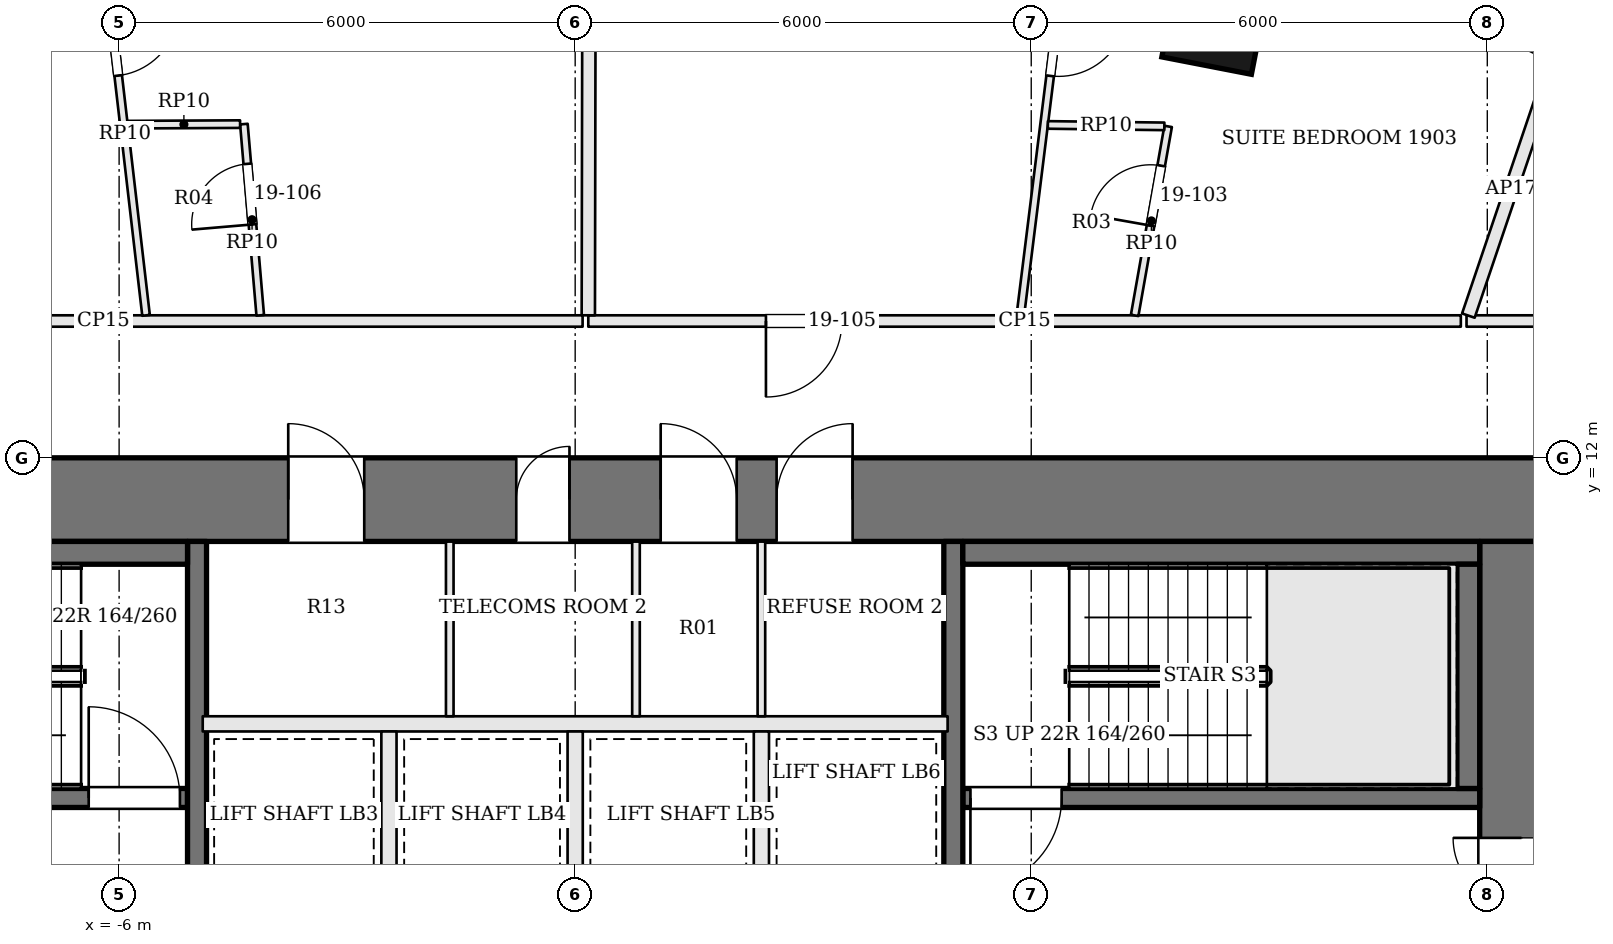
"""IFC4 building model, lengths in metres.
Left out: names, types, materials, properties, quantities, classifications, styles, units other than length and angle.
Written with IfcOpenShell. Run it as: python <this file> out.ifc"""

import sys

from ifc_helpers import new_model, si_unit, direction, frame, frame_2d, origin, origin_2d, place, context, subcontext, project, spatial, rectangle, extrude, element, fill, save


model = new_model("IFC4")
c1 = context("Model", 3, precision=1e-05, world=origin(), true_north=direction((0.0, 1.0)))
c2 = subcontext(c1, "Body", "Model", "MODEL_VIEW")
j1 = project(units=[si_unit("LENGTHUNIT", "METRE"), si_unit("PLANEANGLEUNIT", "RADIAN")], contexts=[c1])
p1 = place(None, origin())
s1 = spatial("IfcSite", under=j1, at=p1, CompositionType="ELEMENT")
p2 = place(p1, origin())
s2 = spatial("IfcBuilding", under=s1, at=p2, CompositionType="ELEMENT")
p3 = place(p2, frame((0.0, 0.0, 85.2)))
s3 = spatial("IfcBuildingStorey", under=s2, at=p3, CompositionType="ELEMENT", Elevation=85.2)
p4 = place(p3, frame((-13.0, 11.45, 0.0), z_axis=(0.0, 0.0, 1.0), x_axis=(1.0, 0.0, 0.0)))
e1 = element("IfcWall", 1, at=p4, inside=s3, PredefinedType="SHEAR", context=c2, shape_type="SweptSolid", body=[
    extrude(rectangle(XDim=26.0, YDim=1.1, at=frame_2d((13.0, 0.0))), origin(), (0.0, 0.0, 1.0), 3.6),
])
p5 = place(p4, frame((9.225, 0.0, 0.0)))
e2 = element("IfcOpeningElement", 2, at=p5, cuts=e1, PredefinedType="OPENING", context=c2, shape_type="SweptSolid", body=[
    extrude(rectangle(XDim=1.0, YDim=2.1, at=frame_2d((0.5, 1.05))), frame((0.0, 0.56, 0.0), z_axis=(0.0, -1.0, 0.0), x_axis=(1.0, 0.0, 0.0)), (0.0, 0.0, 1.0), 1.12),
])
p6 = place(p4, frame((12.225, 0.0, 0.0)))
e3 = element("IfcOpeningElement", 3, at=p6, cuts=e1, PredefinedType="OPENING", context=c2, shape_type="SweptSolid", body=[
    extrude(rectangle(XDim=0.7, YDim=2.1, at=frame_2d((0.35, 1.05))), frame((0.0, 0.56, 0.0), z_axis=(0.0, -1.0, 0.0), x_axis=(1.0, 0.0, 0.0)), (0.0, 0.0, 1.0), 1.12),
])
p7 = place(p4, frame((14.125, 0.0, 0.0)))
e4 = element("IfcOpeningElement", 4, at=p7, cuts=e1, PredefinedType="OPENING", context=c2, shape_type="SweptSolid", body=[
    extrude(rectangle(XDim=1.0, YDim=2.1, at=frame_2d((0.5, 1.05))), frame((0.0, 0.56, 0.0), z_axis=(0.0, -1.0, 0.0), x_axis=(1.0, 0.0, 0.0)), (0.0, 0.0, 1.0), 1.12),
])
p8 = place(p4, frame((15.65, 0.0, 0.0)))
e5 = element("IfcOpeningElement", 5, at=p8, cuts=e1, PredefinedType="OPENING", context=c2, shape_type="SweptSolid", body=[
    extrude(rectangle(XDim=1.0, YDim=2.1, at=frame_2d((0.5, 1.05))), frame((0.0, 0.56, 0.0), z_axis=(0.0, -1.0, 0.0), x_axis=(1.0, 0.0, 0.0)), (0.0, 0.0, 1.0), 1.12),
])
p9 = place(p3, frame((12.45, -1.9, 0.0), z_axis=(0.0, 0.0, 1.0), x_axis=(0.0, 1.0, 0.0)))
e6 = element("IfcWall", 6, at=p9, inside=s3, PredefinedType="SHEAR", context=c2, shape_type="SweptSolid", body=[
    extrude(rectangle(XDim=12.8, YDim=1.1, at=frame_2d((6.4, 0.0))), origin(), (0.0, 0.0, 1.0), 3.6),
])
p10 = place(p9, frame((7.1, 0.0, 0.0)))
e7 = element("IfcOpeningElement", 7, at=p10, cuts=e6, PredefinedType="OPENING", context=c2, shape_type="SweptSolid", body=[
    extrude(rectangle(XDim=1.8, YDim=2.1, at=frame_2d((0.9, 1.05))), frame((0.0, 0.56, 0.0), z_axis=(0.0, -1.0, 0.0), x_axis=(1.0, 0.0, 0.0)), (0.0, 0.0, 1.0), 1.12),
])
p11 = place(p3, frame((8.422, 17.749, 0.0), z_axis=(0.0, 0.0, 1.0), x_axis=(-0.981654668733, 0.19066754143, 0.0)))
e8 = element("IfcColumn", 8, at=p11, inside=s3, PredefinedType="COLUMN", context=c2, shape_type="SweptSolid", body=[
    extrude(rectangle(XDim=1.2, YDim=1.2, at=origin_2d()), origin(), (0.0, 0.0, 1.0), 3.6),
])
p12 = place(p3, frame((12.719, 17.526, 0.0), z_axis=(0.0, 0.0, 1.0), x_axis=(-0.898643806462, 0.438679050226, 0.0)))
e9 = element("IfcWall", 9, at=p12, inside=s3, PredefinedType="SOLIDWALL", context=c2, shape_type="SweptSolid", body=[
    extrude(rectangle(XDim=2.523, YDim=0.45, at=frame_2d((1.262, 0.0))), origin(), (0.0, 0.0, 1.0), 3.4),
])
p13 = place(p12, frame((0.212, 0.0, 0.9)))
e10 = element("IfcOpeningElement", 10, at=p13, cuts=e9, PredefinedType="OPENING", context=c2, shape_type="SweptSolid", body=[
    extrude(rectangle(XDim=2.1, YDim=2.0, at=frame_2d((1.05, 1.0))), frame((0.0, 0.235, 0.0), z_axis=(0.0, -1.0, 0.0), x_axis=(1.0, 0.0, 0.0)), (0.0, 0.0, 1.0), 0.47),
])
p14 = place(p3, frame((11.9, 7.525, 0.0), z_axis=(0.0, 0.0, 1.0), x_axis=(-1.0, 0.0, 0.0)))
e11 = element("IfcWall", 11, at=p14, inside=s3, PredefinedType="SOLIDWALL", context=c2, shape_type="SweptSolid", body=[
    extrude(rectangle(XDim=6.8, YDim=0.25, at=frame_2d((3.4, 0.0))), origin(), (0.0, 0.0, 1.0), 3.4),
])
p15 = place(p14, frame((5.5, 0.0, 0.0)))
e12 = element("IfcOpeningElement", 12, at=p15, cuts=e11, PredefinedType="OPENING", context=c2, shape_type="SweptSolid", body=[
    extrude(rectangle(XDim=1.2, YDim=2.1, at=frame_2d((0.6, 1.05))), frame((0.0, 0.135, 0.0), z_axis=(0.0, -1.0, 0.0), x_axis=(1.0, 0.0, 0.0)), (0.0, 0.0, 1.0), 0.27),
])
p16 = place(p3, frame((-11.9, 7.525, 0.0), z_axis=(0.0, 0.0, 1.0), x_axis=(1.0, 0.0, 0.0)))
e13 = element("IfcWall", 13, at=p16, inside=s3, PredefinedType="SOLIDWALL", context=c2, shape_type="SweptSolid", body=[
    extrude(rectangle(XDim=6.8, YDim=0.25, at=frame_2d((3.4, 0.0))), origin(), (0.0, 0.0, 1.0), 3.4),
])
p17 = place(p16, frame((5.5, 0.0, 0.0)))
e14 = element("IfcOpeningElement", 14, at=p17, cuts=e13, PredefinedType="OPENING", context=c2, shape_type="SweptSolid", body=[
    extrude(rectangle(XDim=1.2, YDim=2.1, at=frame_2d((0.6, 1.05))), frame((0.0, 0.135, 0.0), z_axis=(0.0, -1.0, 0.0), x_axis=(1.0, 0.0, 0.0)), (0.0, 0.0, 1.0), 0.27),
])
p18 = place(p3, frame((-4.975, -1.9, 0.0), z_axis=(0.0, 0.0, 1.0), x_axis=(0.0, 1.0, 0.0)))
e15 = element("IfcWall", 15, at=p18, inside=s3, PredefinedType="SOLIDWALL", context=c2, shape_type="SweptSolid", body=[
    extrude(rectangle(XDim=12.8, YDim=0.25, at=frame_2d((6.4, 0.0))), origin(), (0.0, 0.0, 1.0), 3.4),
])
p19 = place(p18, frame((4.95, 0.0, 0.0)))
e16 = element("IfcOpeningElement", 16, at=p19, cuts=e15, PredefinedType="OPENING", context=c2, shape_type="SweptSolid", body=[
    extrude(rectangle(XDim=1.2, YDim=2.1, at=frame_2d((0.6, 1.05))), frame((0.0, 0.135, 0.0), z_axis=(0.0, -1.0, 0.0), x_axis=(1.0, 0.0, 0.0)), (0.0, 0.0, 1.0), 0.27),
])
p20 = place(p3, frame((4.975, 10.9, 0.0), z_axis=(0.0, 0.0, 1.0), x_axis=(0.0, -1.0, 0.0)))
e17 = element("IfcWall", 17, at=p20, inside=s3, PredefinedType="SOLIDWALL", context=c2, shape_type="SweptSolid", body=[
    extrude(rectangle(XDim=12.8, YDim=0.25, at=frame_2d((6.4, 0.0))), origin(), (0.0, 0.0, 1.0), 3.4),
])
p21 = place(p20, frame((4.95, 0.0, 0.0)))
e18 = element("IfcOpeningElement", 18, at=p21, cuts=e17, PredefinedType="OPENING", context=c2, shape_type="SweptSolid", body=[
    extrude(rectangle(XDim=1.2, YDim=2.1, at=frame_2d((0.6, 1.05))), frame((0.0, 0.135, 0.0), z_axis=(0.0, -1.0, 0.0), x_axis=(1.0, 0.0, 0.0)), (0.0, 0.0, 1.0), 0.27),
])
for number, where, z_axis, x_axis in (
    (19, (-11.9, 10.75, 0.0), (0.0, 0.0, 1.0), (1.0, 0.0, 0.0)),
    (20, (11.9, 10.75, 0.0), (0.0, 0.0, 1.0), (-1.0, 0.0, 0.0)),
):
    element("IfcWall", number, at=place(p3, frame(where, z_axis=z_axis, x_axis=x_axis)), inside=s3, PredefinedType="SOLIDWALL", context=c2, shape_type="SweptSolid", body=[
        extrude(rectangle(XDim=6.8, YDim=0.3, at=frame_2d((3.4, 0.0))), origin(), (0.0, 0.0, 1.0), 3.4),
    ])
p22 = place(p3, frame((11.75, 10.6, 0.0), z_axis=(0.0, 0.0, 1.0), x_axis=(0.0, -1.0, 0.0)))
e21 = element("IfcWall", 21, at=p22, inside=s3, PredefinedType="SOLIDWALL", context=c2, shape_type="SweptSolid", body=[
    extrude(rectangle(XDim=2.95, YDim=0.3, at=frame_2d((1.475, 0.0))), origin(), (0.0, 0.0, 1.0), 3.4),
])
p23 = place(p3, frame((-4.9, 8.5, 0.0), z_axis=(0.0, 0.0, 1.0), x_axis=(1.0, 0.0, 0.0)))
e22 = element("IfcWall", 22, at=p23, inside=s3, PredefinedType="SOLIDWALL", context=c2, shape_type="SweptSolid", body=[
    extrude(rectangle(XDim=9.8, YDim=0.2, at=frame_2d((4.9, 0.0))), origin(), (0.0, 0.0, 1.0), 3.4),
])
for number, where, z_axis, x_axis in (
    (23, (-2.45, 6.2, 0.0), (0.0, 0.0, 1.0), (0.0, 1.0, 0.0)),
    (24, (0.0, 6.2, 0.0), (0.0, 0.0, 1.0), (0.0, 1.0, 0.0)),
    (25, (2.45, 6.2, 0.0), (0.0, 0.0, 1.0), (0.0, 1.0, 0.0)),
):
    element("IfcWall", number, at=place(p3, frame(where, z_axis=z_axis, x_axis=x_axis)), inside=s3, PredefinedType="SOLIDWALL", context=c2, shape_type="SweptSolid", body=[
        extrude(rectangle(XDim=2.2, YDim=0.2, at=frame_2d((1.1, 0.0))), origin(), (0.0, 0.0, 1.0), 3.4),
    ])
for number, where, z_axis, x_axis in (
    (26, (-1.65, 8.6, 0.0), (0.0, 0.0, 1.0), (0.0, 1.0, 0.0)),
    (27, (0.8, 8.6, 0.0), (0.0, 0.0, 1.0), (0.0, 1.0, 0.0)),
    (28, (2.45, 8.6, 0.0), (0.0, 0.0, 1.0), (0.0, 1.0, 0.0)),
):
    element("IfcWall", number, at=place(p3, frame(where, z_axis=z_axis, x_axis=x_axis)), inside=s3, PredefinedType="PARTITIONING", context=c2, shape_type="SweptSolid", body=[
        extrude(rectangle(XDim=2.3, YDim=0.1, at=frame_2d((1.15, 0.0))), origin(), (0.0, 0.0, 1.0), 3.4),
    ])
p24 = place(p3, frame((14.725, 13.8, 0.0), z_axis=(0.0, 0.0, 1.0), x_axis=(-1.0, 0.0, 0.0)))
e29 = element("IfcWall", 29, at=p24, inside=s3, PredefinedType="PARTITIONING", context=c2, shape_type="SweptSolid", body=[
    extrude(rectangle(XDim=2.998, YDim=0.15, at=frame_2d((1.499, 0.0))), origin(), (0.0, 0.0, 1.0), 2.784),
])
p25 = place(p3, frame((12.878, 17.2, 0.0), z_axis=(0.0, 0.0, 1.0), x_axis=(-0.320642197559, -0.947200391229, 0.0)))
e30 = element("IfcWall", 30, at=p25, inside=s3, PredefinedType="PARTITIONING", context=c2, shape_type="SweptSolid", body=[
    extrude(rectangle(XDim=3.515, YDim=0.175, at=frame_2d((1.757, 0.0))), origin(), (0.0, 0.0, 1.0), 2.784),
])
p26 = place(p3, frame((11.652, 13.8, 0.0), z_axis=(0.0, 0.0, 1.0), x_axis=(-1.0, 0.0, 0.0)))
e31 = element("IfcWall", 31, at=p26, inside=s3, PredefinedType="PARTITIONING", context=c2, shape_type="SweptSolid", body=[
    extrude(rectangle(XDim=11.479, YDim=0.15, at=frame_2d((5.74, 0.0))), origin(), (0.0, 0.0, 1.0), 2.784),
])
p27 = place(p26, frame((8.142, 0.0, 0.0)))
e32 = element("IfcOpeningElement", 32, at=p27, cuts=e31, PredefinedType="OPENING", context=c2, shape_type="SweptSolid", body=[
    extrude(rectangle(XDim=1.0, YDim=2.1, at=frame_2d((0.5, 1.05))), frame((0.0, 0.085, 0.0), z_axis=(0.0, -1.0, 0.0), x_axis=(1.0, 0.0, 0.0)), (0.0, 0.0, 1.0), 0.17),
])
p28 = place(p3, frame((0.189, 22.19, 0.0), z_axis=(0.0, 0.0, 1.0), x_axis=(-0.001967286324, -0.99999806489, 0.0)))
e33 = element("IfcWall", 33, at=p28, inside=s3, PredefinedType="PARTITIONING", context=c2, shape_type="SweptSolid", body=[
    extrude(rectangle(XDim=8.315, YDim=0.175, at=frame_2d((4.157, 0.0))), origin(), (0.0, 0.0, 1.0), 2.784),
])
p29 = place(p3, frame((0.098, 13.8, 0.0), z_axis=(0.0, 0.0, 1.0), x_axis=(-1.0, 0.0, 0.0)))
e34 = element("IfcWall", 34, at=p29, inside=s3, PredefinedType="PARTITIONING", context=c2, shape_type="SweptSolid", body=[
    extrude(rectangle(XDim=12.609, YDim=0.15, at=frame_2d((6.304, 0.0))), origin(), (0.0, 0.0, 1.0), 2.784),
])
p30 = place(p29, frame((8.672, 0.0, 0.0)))
e35 = element("IfcOpeningElement", 35, at=p30, cuts=e34, PredefinedType="OPENING", context=c2, shape_type="SweptSolid", body=[
    extrude(rectangle(XDim=1.0, YDim=2.1, at=frame_2d((0.5, 1.05))), frame((0.0, 0.085, 0.0), z_axis=(0.0, -1.0, 0.0), x_axis=(1.0, 0.0, 0.0)), (0.0, 0.0, 1.0), 0.17),
])
p31 = place(p3, frame((6.784, 21.325, 0.0), z_axis=(0.0, 0.0, 1.0), x_axis=(-0.123570456303, -0.992335801193, 0.0)))
e36 = element("IfcWall", 36, at=p31, inside=s3, PredefinedType="PARTITIONING", context=c2, shape_type="SweptSolid", body=[
    extrude(rectangle(XDim=7.508, YDim=0.1, at=frame_2d((3.754, 0.0))), origin(), (0.0, 0.0, 1.0), 2.784),
])
p32 = place(p31, frame((3.433, 0.0, 0.0)))
e37 = element("IfcOpeningElement", 37, at=p32, cuts=e36, PredefinedType="OPENING", context=c2, shape_type="SweptSolid", body=[
    extrude(rectangle(XDim=0.9, YDim=2.4, at=frame_2d((0.45, 1.2))), frame((0.0, 0.06, 0.0), z_axis=(0.0, -1.0, 0.0), x_axis=(1.0, 0.0, 0.0)), (0.0, 0.0, 1.0), 0.12),
])
p33 = place(p3, frame((7.361, 13.874, 0.0), z_axis=(0.0, 0.0, 1.0), x_axis=(0.17451886907, 0.984653829698, 0.0)))
e38 = element("IfcWall", 38, at=p33, inside=s3, PredefinedType="PARTITIONING", context=c2, shape_type="SweptSolid", body=[
    extrude(rectangle(XDim=2.525, YDim=0.1, at=frame_2d((1.263, 0.0))), origin(), (0.0, 0.0, 1.0), 2.784),
])
p34 = place(p33, frame((1.2, 0.0, 0.0)))
e39 = element("IfcOpeningElement", 39, at=p34, cuts=e38, PredefinedType="OPENING", context=c2, shape_type="SweptSolid", body=[
    extrude(rectangle(XDim=0.8, YDim=2.1, at=frame_2d((0.4, 1.05))), frame((0.0, 0.06, 0.0), z_axis=(0.0, -1.0, 0.0), x_axis=(1.0, 0.0, 0.0)), (0.0, 0.0, 1.0), 0.12),
])
p35 = place(p3, frame((7.751, 16.361, 0.0), z_axis=(0.0, 0.0, 1.0), x_axis=(-0.999924768766, 0.01226608367, 0.0)))
e40 = element("IfcWall", 40, at=p35, inside=s3, PredefinedType="PARTITIONING", context=c2, shape_type="SweptSolid", body=[
    extrude(rectangle(XDim=1.532, YDim=0.1, at=frame_2d((0.766, 0.0))), origin(), (0.0, 0.0, 1.0), 2.784),
])
p36 = place(p3, frame((-6.199, 18.642, 0.0), z_axis=(0.0, 0.0, 1.0), x_axis=(0.115421487153, -0.993316606276, 0.0)))
e41 = element("IfcWall", 41, at=p36, inside=s3, PredefinedType="PARTITIONING", context=c2, shape_type="SweptSolid", body=[
    extrude(rectangle(XDim=4.799, YDim=0.1, at=frame_2d((2.4, 0.0))), origin(), (0.0, 0.0, 1.0), 2.784),
])
p37 = place(p36, frame((0.724, 0.0, 0.0)))
e42 = element("IfcOpeningElement", 42, at=p37, cuts=e41, PredefinedType="OPENING", context=c2, shape_type="SweptSolid", body=[
    extrude(rectangle(XDim=0.9, YDim=2.4, at=frame_2d((0.45, 1.2))), frame((0.0, 0.06, 0.0), z_axis=(0.0, -1.0, 0.0), x_axis=(1.0, 0.0, 0.0)), (0.0, 0.0, 1.0), 0.12),
])
p38 = place(p3, frame((-4.143, 13.875, 0.0), z_axis=(0.0, 0.0, 1.0), x_axis=(-0.085189957814, 0.996364727942, 0.0)))
e43 = element("IfcWall", 43, at=p38, inside=s3, PredefinedType="PARTITIONING", context=c2, shape_type="SweptSolid", body=[
    extrude(rectangle(XDim=2.525, YDim=0.1, at=frame_2d((1.262, 0.0))), origin(), (0.0, 0.0, 1.0), 2.784),
])
p39 = place(p38, frame((1.2, 0.0, 0.0)))
e44 = element("IfcOpeningElement", 44, at=p39, cuts=e43, PredefinedType="OPENING", context=c2, shape_type="SweptSolid", body=[
    extrude(rectangle(XDim=0.8, YDim=2.1, at=frame_2d((0.4, 1.05))), frame((0.0, 0.06, 0.0), z_axis=(0.0, -1.0, 0.0), x_axis=(1.0, 0.0, 0.0)), (0.0, 0.0, 1.0), 0.12),
])
p40 = place(p3, frame((-4.408, 16.39, 0.0), z_axis=(0.0, 0.0, 1.0), x_axis=(-0.999987730333, -0.00495370408, 0.0)))
e45 = element("IfcWall", 45, at=p40, inside=s3, PredefinedType="PARTITIONING", context=c2, shape_type="SweptSolid", body=[
    extrude(rectangle(XDim=1.479, YDim=0.1, at=frame_2d((0.739, 0.0))), origin(), (0.0, 0.0, 1.0), 2.784),
])
p41 = place(p10, origin())
e46 = element("IfcDoor", 46, at=p41, inside=s3, OperationType="DOUBLE_DOOR_SINGLE_SWING", PredefinedType="DOOR", context=c2, shape_type="SweptSolid", body=[
    extrude(rectangle(XDim=1.8, YDim=2.1, at=frame_2d((0.9, 1.05))), frame((0.0, 0.025, 0.0), z_axis=(0.0, -1.0, 0.0), x_axis=(1.0, 0.0, 0.0)), (0.0, 0.0, 1.0), 0.05),
])
fill(e7, e46)
p42 = place(p15, origin())
e47 = element("IfcDoor", 47, at=p42, inside=s3, OperationType="SINGLE_SWING_RIGHT", PredefinedType="DOOR", context=c2, shape_type="SweptSolid", body=[
    extrude(rectangle(XDim=1.2, YDim=2.1, at=frame_2d((0.6, 1.05))), frame((0.0, 0.025, 0.0), z_axis=(0.0, -1.0, 0.0), x_axis=(1.0, 0.0, 0.0)), (0.0, 0.0, 1.0), 0.05),
])
fill(e12, e47)
p43 = place(p17, origin())
e48 = element("IfcDoor", 48, at=p43, inside=s3, OperationType="SINGLE_SWING_LEFT", PredefinedType="DOOR", context=c2, shape_type="SweptSolid", body=[
    extrude(rectangle(XDim=1.2, YDim=2.1, at=frame_2d((0.6, 1.05))), frame((0.0, 0.025, 0.0), z_axis=(0.0, -1.0, 0.0), x_axis=(1.0, 0.0, 0.0)), (0.0, 0.0, 1.0), 0.05),
])
fill(e14, e48)
p44 = place(p5, origin())
e49 = element("IfcDoor", 49, at=p44, inside=s3, OperationType="SINGLE_SWING_LEFT", PredefinedType="DOOR", context=c2, shape_type="SweptSolid", body=[
    extrude(rectangle(XDim=1.0, YDim=2.1, at=frame_2d((0.5, 1.05))), frame((0.0, 0.025, 0.0), z_axis=(0.0, -1.0, 0.0), x_axis=(1.0, 0.0, 0.0)), (0.0, 0.0, 1.0), 0.05),
])
fill(e2, e49)
p45 = place(p6, origin())
e50 = element("IfcDoor", 50, at=p45, inside=s3, OperationType="SINGLE_SWING_RIGHT", PredefinedType="DOOR", context=c2, shape_type="SweptSolid", body=[
    extrude(rectangle(XDim=0.7, YDim=2.1, at=frame_2d((0.35, 1.05))), frame((0.0, 0.025, 0.0), z_axis=(0.0, -1.0, 0.0), x_axis=(1.0, 0.0, 0.0)), (0.0, 0.0, 1.0), 0.05),
])
fill(e3, e50)
p46 = place(p7, origin())
e51 = element("IfcDoor", 51, at=p46, inside=s3, OperationType="SINGLE_SWING_LEFT", PredefinedType="DOOR", context=c2, shape_type="SweptSolid", body=[
    extrude(rectangle(XDim=1.0, YDim=2.1, at=frame_2d((0.5, 1.05))), frame((0.0, 0.025, 0.0), z_axis=(0.0, -1.0, 0.0), x_axis=(1.0, 0.0, 0.0)), (0.0, 0.0, 1.0), 0.05),
])
fill(e4, e51)
p47 = place(p8, origin())
e52 = element("IfcDoor", 52, at=p47, inside=s3, OperationType="SINGLE_SWING_RIGHT", PredefinedType="DOOR", context=c2, shape_type="SweptSolid", body=[
    extrude(rectangle(XDim=1.0, YDim=2.1, at=frame_2d((0.5, 1.05))), frame((0.0, 0.025, 0.0), z_axis=(0.0, -1.0, 0.0), x_axis=(1.0, 0.0, 0.0)), (0.0, 0.0, 1.0), 0.05),
])
fill(e5, e52)
p48 = place(p34, origin())
e53 = element("IfcDoor", 53, at=p48, inside=s3, OperationType="SINGLE_SWING_LEFT", PredefinedType="DOOR", context=c2, shape_type="SweptSolid", body=[
    extrude(rectangle(XDim=0.8, YDim=2.1, at=frame_2d((0.4, 1.05))), frame((0.0, 0.025, 0.0), z_axis=(0.0, -1.0, 0.0), x_axis=(1.0, 0.0, 0.0)), (0.0, 0.0, 1.0), 0.05),
])
fill(e39, e53)
p49 = place(p32, origin())
e54 = element("IfcDoor", 54, at=p49, inside=s3, OperationType="SINGLE_SWING_LEFT", PredefinedType="DOOR", context=c2, shape_type="SweptSolid", body=[
    extrude(rectangle(XDim=0.9, YDim=2.4, at=frame_2d((0.45, 1.2))), frame((0.0, 0.025, 0.0), z_axis=(0.0, -1.0, 0.0), x_axis=(1.0, 0.0, 0.0)), (0.0, 0.0, 1.0), 0.05),
])
fill(e37, e54)
p50 = place(p27, origin())
e55 = element("IfcDoor", 55, at=p50, inside=s3, OperationType="SINGLE_SWING_RIGHT", PredefinedType="DOOR", context=c2, shape_type="SweptSolid", body=[
    extrude(rectangle(XDim=1.0, YDim=2.1, at=frame_2d((0.5, 1.05))), frame((0.0, 0.025, 0.0), z_axis=(0.0, -1.0, 0.0), x_axis=(1.0, 0.0, 0.0)), (0.0, 0.0, 1.0), 0.05),
])
fill(e32, e55)
p51 = place(p39, origin())
e56 = element("IfcDoor", 56, at=p51, inside=s3, OperationType="SINGLE_SWING_LEFT", PredefinedType="DOOR", context=c2, shape_type="SweptSolid", body=[
    extrude(rectangle(XDim=0.8, YDim=2.1, at=frame_2d((0.4, 1.05))), frame((0.0, 0.025, 0.0), z_axis=(0.0, -1.0, 0.0), x_axis=(1.0, 0.0, 0.0)), (0.0, 0.0, 1.0), 0.05),
])
fill(e44, e56)
p52 = place(p37, origin())
e57 = element("IfcDoor", 57, at=p52, inside=s3, OperationType="SINGLE_SWING_LEFT", PredefinedType="DOOR", context=c2, shape_type="SweptSolid", body=[
    extrude(rectangle(XDim=0.9, YDim=2.4, at=frame_2d((0.45, 1.2))), frame((0.0, 0.025, 0.0), z_axis=(0.0, -1.0, 0.0), x_axis=(1.0, 0.0, 0.0)), (0.0, 0.0, 1.0), 0.05),
])
fill(e42, e57)
save(model, sys.argv[1])
